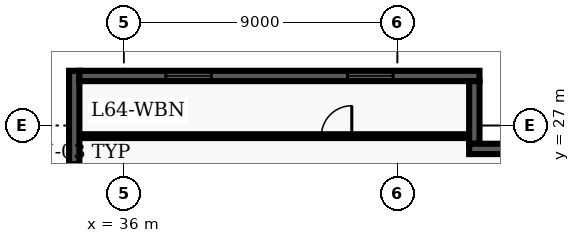
"""IFC4 building model, lengths in metres.
Left out: names, types, materials, properties, quantities, classifications, styles, units other than length and angle.
Written with IfcOpenShell. Run it as: python <this file> out.ifc"""

import sys

from ifc_helpers import new_model, entity, si_unit, converted_unit, direction, frame, origin_with_axes, origin_2d_with_axis, place, context, subcontext, project, spatial, polyline, rectangle, outline, extrude, element, fill, save


model = new_model("IFC4")
c1 = context("Model", 3, precision=1e-05, world=origin_with_axes(), true_north=direction((0.0, 1.0)))
c2 = subcontext(c1, "Body", "Model", "MODEL_VIEW")
j1 = project(units=[si_unit("LENGTHUNIT", "METRE"), converted_unit("PLANEANGLEUNIT", "DEGREE", entity("IfcPlaneAngleMeasure", 0.017), si_unit("PLANEANGLEUNIT", "RADIAN"), dimensions=[0, 0, 0, 0, 0, 0, 0])], contexts=[c1])
p1 = place(None, origin_with_axes())
s1 = spatial("IfcSite", under=j1, at=p1, CompositionType="ELEMENT")
p2 = place(p1, origin_with_axes())
s2 = spatial("IfcBuilding", under=s1, at=p2, CompositionType="ELEMENT")
p3 = place(p2, frame((0.0, 0.0, 260.7), z_axis=(0.0, 0.0, 1.0), x_axis=(1.0, 0.0, 0.0)))
s3 = spatial("IfcBuildingStorey", under=s2, at=p3, CompositionType="ELEMENT", Elevation=260.7)
p4 = place(p3, frame((34.535, 26.65, 0.0), z_axis=(0.0, 0.0, 1.0), x_axis=(1.0, 0.0, 0.0)))
e1 = element("IfcWall", 1, at=p4, inside=s3, PredefinedType="PARTITIONING", context=c2, shape_type="SweptSolid", body=[
    extrude(outline(polyline([(0.0, -0.062), (12.995, -0.062), (12.995, 0.062), (0.0, 0.062), (0.0, -0.062)])), origin_with_axes(), (0.0, 0.0, 1.0), 2.7),
])
p5 = place(p4, frame((8.465, 0.0, 0.0), z_axis=(0.0, 0.0, 1.0), x_axis=(1.0, 0.0, 0.0)))
e2 = element("IfcOpeningElement", 2, at=p5, cuts=e1, PredefinedType="OPENING", context=c2, shape_type="SweptSolid", body=[
    extrude(rectangle(XDim=1.0, YDim=0.145, at=origin_2d_with_axis()), origin_with_axes(), (0.0, 0.0, 1.0), 2.15),
])
p6 = place(p3, frame((34.37, 21.26, 0.0), z_axis=(0.0, 0.0, 1.0), x_axis=(0.0, 1.0, 0.0)))
e3 = element("IfcWall", 3, at=p6, inside=s3, PredefinedType="SOLIDWALL", context=c2, shape_type="SweptSolid", body=[
    extrude(outline(polyline([(0.0, -0.17), (7.54, -0.17), (7.54, 0.17), (0.0, 0.17), (0.0, -0.17)])), origin_with_axes(), (0.0, 0.0, 1.0), 3.66),
])
p7 = place(p6, frame((3.77, 0.0, 0.45), z_axis=(0.0, 0.0, 1.0), x_axis=(1.0, 0.0, 0.0)))
e4 = element("IfcOpeningElement", 4, at=p7, cuts=e3, PredefinedType="OPENING", context=c2, shape_type="SweptSolid", body=[
    extrude(rectangle(XDim=1.5, YDim=0.36, at=origin_2d_with_axis()), origin_with_axes(), (0.0, 0.0, 1.0), 2.1),
])
p8 = place(p3, frame((34.54, 28.63, 0.0), z_axis=(0.0, 0.0, 1.0), x_axis=(1.0, 0.0, 0.0)))
e5 = element("IfcWall", 5, at=p8, inside=s3, PredefinedType="SOLIDWALL", context=c2, shape_type="SweptSolid", body=[
    extrude(outline(polyline([(0.0, -0.17), (13.16, -0.17), (13.16, 0.17), (0.0, 0.17), (0.0, -0.17)])), origin_with_axes(), (0.0, 0.0, 1.0), 3.66),
])
p9 = place(p8, frame((3.59, 0.0, 0.45), z_axis=(0.0, 0.0, 1.0), x_axis=(1.0, 0.0, 0.0)))
e6 = element("IfcOpeningElement", 6, at=p9, cuts=e5, PredefinedType="OPENING", context=c2, shape_type="SweptSolid", body=[
    extrude(rectangle(XDim=1.5, YDim=0.36, at=origin_2d_with_axis()), origin_with_axes(), (0.0, 0.0, 1.0), 2.1),
])
p10 = place(p8, frame((9.57, 0.0, 0.45), z_axis=(0.0, 0.0, 1.0), x_axis=(1.0, 0.0, 0.0)))
e7 = element("IfcOpeningElement", 7, at=p10, cuts=e5, PredefinedType="OPENING", context=c2, shape_type="SweptSolid", body=[
    extrude(rectangle(XDim=1.5, YDim=0.36, at=origin_2d_with_axis()), origin_with_axes(), (0.0, 0.0, 1.0), 2.1),
])
p11 = place(p3, frame((47.53, 28.46, 0.0), z_axis=(0.0, 0.0, 1.0), x_axis=(0.0, -1.0, 0.0)))
e8 = element("IfcWall", 8, at=p11, inside=s3, PredefinedType="SOLIDWALL", context=c2, shape_type="SweptSolid", body=[
    extrude(outline(polyline([(0.0, -0.17), (2.06, -0.17), (2.06, 0.17), (0.0, 0.17), (0.0, -0.17)])), origin_with_axes(), (0.0, 0.0, 1.0), 3.66),
])
p12 = place(p3, frame((47.36, 26.23, 0.0), z_axis=(0.0, 0.0, 1.0), x_axis=(1.0, 0.0, 0.0)))
e9 = element("IfcWall", 9, at=p12, inside=s3, PredefinedType="SOLIDWALL", context=c2, shape_type="SweptSolid", body=[
    extrude(outline(polyline([(0.0, -0.17), (2.74, -0.17), (2.74, 0.17), (0.0, 0.17), (0.0, -0.17)])), origin_with_axes(), (0.0, 0.0, 1.0), 3.66),
])
p13 = place(p4, frame((8.465, 0.0, 0.0), z_axis=(0.0, 0.0, 1.0), x_axis=(1.0, 0.0, 0.0)))
e10 = element("IfcDoor", 10, at=p13, inside=s3, OperationType="SINGLE_SWING_RIGHT", PredefinedType="DOOR", context=c2, shape_type="SweptSolid", body=[
    extrude(rectangle(XDim=1.0, YDim=0.075, at=origin_2d_with_axis()), origin_with_axes(), (0.0, 0.0, 1.0), 2.15),
])
fill(e2, e10)
p14 = place(p8, frame((3.59, 0.0, 0.45), z_axis=(0.0, 0.0, 1.0), x_axis=(1.0, 0.0, 0.0)))
e11 = element("IfcWindow", 11, at=p14, inside=s3, PredefinedType="WINDOW", context=c2, shape_type="SweptSolid", body=[
    extrude(rectangle(XDim=1.5, YDim=0.09, at=origin_2d_with_axis()), origin_with_axes(), (0.0, 0.0, 1.0), 2.1),
])
fill(e6, e11)
p15 = place(p8, frame((9.57, 0.0, 0.45), z_axis=(0.0, 0.0, 1.0), x_axis=(1.0, 0.0, 0.0)))
e12 = element("IfcWindow", 12, at=p15, inside=s3, PredefinedType="WINDOW", context=c2, shape_type="SweptSolid", body=[
    extrude(rectangle(XDim=1.5, YDim=0.09, at=origin_2d_with_axis()), origin_with_axes(), (0.0, 0.0, 1.0), 2.1),
])
fill(e7, e12)
save(model, sys.argv[1])
